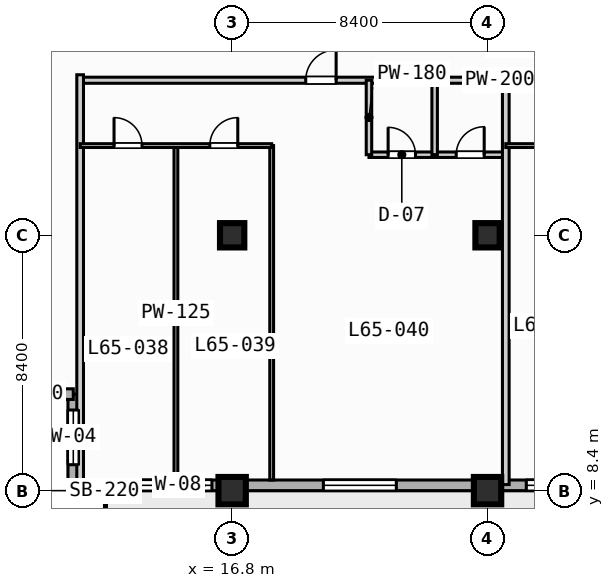
"""IFC4 building model, lengths in metres.
Left out: names, types, materials, properties, quantities, classifications, styles, units other than length and angle.
Written with IfcOpenShell. Run it as: python <this file> out.ifc"""

import sys

from ifc_helpers import new_model, si_unit, direction, frame, frame_2d, origin, origin_2d, place, context, subcontext, project, spatial, rectangle, extrude, element, fill, save


model = new_model("IFC4")
c1 = context("Model", 3, precision=1e-05, world=origin(), true_north=direction((0.0, 1.0)))
c2 = subcontext(c1, "Body", "Model", "MODEL_VIEW")
j1 = project(units=[si_unit("LENGTHUNIT", "METRE"), si_unit("PLANEANGLEUNIT", "RADIAN")], contexts=[c1])
p1 = place(None, origin())
s1 = spatial("IfcSite", under=j1, at=p1, CompositionType="ELEMENT")
p2 = place(p1, origin())
s2 = spatial("IfcBuilding", under=s1, at=p2, CompositionType="ELEMENT")
p3 = place(p2, frame((0.0, 0.0, 263.8)))
s3 = spatial("IfcBuildingStorey", under=s2, at=p3, CompositionType="ELEMENT", Elevation=263.8)
p4 = place(p3, frame((16.8, 8.4, 0.0), z_axis=(0.0, 0.0, 1.0), x_axis=(1.0, 0.0, 0.0)))
e1 = element("IfcColumn", 1, at=p4, inside=s3, PredefinedType="COLUMN", context=c2, shape_type="SweptSolid", body=[
    extrude(rectangle(XDim=0.9, YDim=0.9, at=origin_2d()), origin(), (0.0, 0.0, 1.0), 3.7),
])
p5 = place(p3, frame((16.8, 16.8, 0.0), z_axis=(0.0, 0.0, 1.0), x_axis=(1.0, 0.0, 0.0)))
e2 = element("IfcColumn", 2, at=p5, inside=s3, PredefinedType="COLUMN", context=c2, shape_type="SweptSolid", body=[
    extrude(rectangle(XDim=0.8, YDim=0.8, at=origin_2d()), origin(), (0.0, 0.0, 1.0), 3.7),
])
p6 = place(p3, frame((25.2, 8.4, 0.0), z_axis=(0.0, 0.0, 1.0), x_axis=(1.0, 0.0, 0.0)))
e3 = element("IfcColumn", 3, at=p6, inside=s3, PredefinedType="COLUMN", context=c2, shape_type="SweptSolid", body=[
    extrude(rectangle(XDim=0.9, YDim=0.9, at=origin_2d()), origin(), (0.0, 0.0, 1.0), 3.7),
])
p7 = place(p3, frame((25.2, 16.8, 0.0), z_axis=(0.0, 0.0, 1.0), x_axis=(1.0, 0.0, 0.0)))
e4 = element("IfcColumn", 4, at=p7, inside=s3, PredefinedType="COLUMN", context=c2, shape_type="SweptSolid", body=[
    extrude(rectangle(XDim=0.8, YDim=0.8, at=origin_2d()), origin(), (0.0, 0.0, 1.0), 3.7),
])
p8 = place(p3, frame((11.575, 8.575, 0.0), z_axis=(0.0, 0.0, 1.0), x_axis=(0.0, 1.0, 0.0)))
e5 = element("IfcWall", 5, at=p8, inside=s3, PredefinedType="STANDARD", context=c2, shape_type="SweptSolid", body=[
    extrude(rectangle(XDim=3.0, YDim=0.35, at=frame_2d((1.5, 0.0))), origin(), (0.0, 0.0, 1.0), 3.47),
])
p9 = place(p8, frame((0.677, 0.0, 0.85)))
e6 = element("IfcOpeningElement", 6, at=p9, cuts=e5, PredefinedType="OPENING", context=c2, shape_type="SweptSolid", body=[
    extrude(rectangle(XDim=1.8, YDim=1.8, at=frame_2d((0.9, 0.9))), frame((0.0, 0.185, 0.0), z_axis=(0.0, -1.0, 0.0), x_axis=(1.0, 0.0, 0.0)), (0.0, 0.0, 1.0), 0.37),
])
p10 = place(p3, frame((11.575, 11.575, 0.0), z_axis=(0.0, 0.0, 1.0), x_axis=(-1.0, 0.0, 0.0)))
e7 = element("IfcWall", 7, at=p10, inside=s3, PredefinedType="STANDARD", context=c2, shape_type="SweptSolid", body=[
    extrude(rectangle(XDim=3.0, YDim=0.35, at=frame_2d((1.5, 0.0))), origin(), (0.0, 0.0, 1.0), 3.47),
])
p11 = place(p3, frame((72.425, 8.575, 0.0), z_axis=(0.0, 0.0, 1.0), x_axis=(-1.0, 0.0, 0.0)))
e8 = element("IfcWall", 8, at=p11, inside=s3, PredefinedType="STANDARD", context=c2, shape_type="SweptSolid", body=[
    extrude(rectangle(XDim=60.85, YDim=0.35, at=frame_2d((30.425, 0.0))), origin(), (0.0, 0.0, 1.0), 3.47),
])
p12 = place(p11, frame((41.325, 0.0, 0.0)))
e9 = element("IfcOpeningElement", 9, at=p12, cuts=e8, PredefinedType="OPENING", context=c2, shape_type="SweptSolid", body=[
    extrude(rectangle(XDim=1.4, YDim=2.2, at=frame_2d((0.7, 1.1))), frame((0.0, 0.185, 0.0), z_axis=(0.0, -1.0, 0.0), x_axis=(1.0, 0.0, 0.0)), (0.0, 0.0, 1.0), 0.37),
])
p13 = place(p11, frame((50.225, 0.0, 0.85)))
e10 = element("IfcOpeningElement", 10, at=p13, cuts=e8, PredefinedType="OPENING", context=c2, shape_type="SweptSolid", body=[
    extrude(rectangle(XDim=2.4, YDim=1.95, at=frame_2d((1.2, 0.975))), frame((0.0, 0.185, 0.0), z_axis=(0.0, -1.0, 0.0), x_axis=(1.0, 0.0, 0.0)), (0.0, 0.0, 1.0), 0.37),
])
p14 = place(p11, frame((33.425, 0.0, 0.85)))
e11 = element("IfcOpeningElement", 11, at=p14, cuts=e8, PredefinedType="OPENING", context=c2, shape_type="SweptSolid", body=[
    extrude(rectangle(XDim=2.4, YDim=1.95, at=frame_2d((1.2, 0.975))), frame((0.0, 0.185, 0.0), z_axis=(0.0, -1.0, 0.0), x_axis=(1.0, 0.0, 0.0)), (0.0, 0.0, 1.0), 0.37),
])
p15 = place(p11, frame((25.325, 0.0, 0.85)))
e12 = element("IfcOpeningElement", 12, at=p15, cuts=e8, PredefinedType="OPENING", context=c2, shape_type="SweptSolid", body=[
    extrude(rectangle(XDim=1.8, YDim=1.8, at=frame_2d((0.9, 0.9))), frame((0.0, 0.185, 0.0), z_axis=(0.0, -1.0, 0.0), x_axis=(1.0, 0.0, 0.0)), (0.0, 0.0, 1.0), 0.37),
])
p16 = place(p11, frame((58.15, 0.0, 0.85)))
e13 = element("IfcOpeningElement", 13, at=p16, cuts=e8, PredefinedType="OPENING", context=c2, shape_type="SweptSolid", body=[
    extrude(rectangle(XDim=1.8, YDim=1.8, at=frame_2d((0.9, 0.9))), frame((0.0, 0.185, 0.0), z_axis=(0.0, -1.0, 0.0), x_axis=(1.0, 0.0, 0.0)), (0.0, 0.0, 1.0), 0.37),
])
p17 = place(p11, frame((56.29, 0.0, 0.85)))
e14 = element("IfcOpeningElement", 14, at=p17, cuts=e8, PredefinedType="OPENING", context=c2, shape_type="SweptSolid", body=[
    extrude(rectangle(XDim=0.72, YDim=1.8, at=frame_2d((0.36, 0.9))), frame((0.0, 0.185, 0.0), z_axis=(0.0, -1.0, 0.0), x_axis=(1.0, 0.0, 0.0)), (0.0, 0.0, 1.0), 0.37),
])
p18 = place(p11, frame((44.15, 0.0, 0.85)))
e15 = element("IfcOpeningElement", 15, at=p18, cuts=e8, PredefinedType="OPENING", context=c2, shape_type="SweptSolid", body=[
    extrude(rectangle(XDim=1.8, YDim=1.8, at=frame_2d((0.9, 0.9))), frame((0.0, 0.185, 0.0), z_axis=(0.0, -1.0, 0.0), x_axis=(1.0, 0.0, 0.0)), (0.0, 0.0, 1.0), 0.37),
])
p19 = place(p3, frame((11.8, 21.9, 0.0), z_axis=(0.0, 0.0, 1.0), x_axis=(1.0, 0.0, 0.0)))
e16 = element("IfcWall", 16, at=p19, inside=s3, PredefinedType="PARTITIONING", context=c2, shape_type="SweptSolid", body=[
    extrude(rectangle(XDim=27.6, YDim=0.2, at=frame_2d((13.8, 0.0))), origin(), (0.0, 0.0, 1.0), 3.47),
])
p20 = place(p19, frame((7.42, 0.0, 0.0)))
e17 = element("IfcOpeningElement", 17, at=p20, cuts=e16, PredefinedType="OPENING", context=c2, shape_type="SweptSolid", body=[
    extrude(rectangle(XDim=1.0, YDim=2.15, at=frame_2d((0.5, 1.075))), frame((0.0, 0.11, 0.0), z_axis=(0.0, -1.0, 0.0), x_axis=(1.0, 0.0, 0.0)), (0.0, 0.0, 1.0), 0.22),
])
p21 = place(p19, frame((21.22, 0.0, 0.0)))
e18 = element("IfcOpeningElement", 18, at=p21, cuts=e16, PredefinedType="OPENING", context=c2, shape_type="SweptSolid", body=[
    extrude(rectangle(XDim=1.0, YDim=2.15, at=frame_2d((0.5, 1.075))), frame((0.0, 0.11, 0.0), z_axis=(0.0, -1.0, 0.0), x_axis=(1.0, 0.0, 0.0)), (0.0, 0.0, 1.0), 0.22),
])
p22 = place(p3, frame((11.8, 8.6, 0.0), z_axis=(0.0, 0.0, 1.0), x_axis=(0.0, 1.0, 0.0)))
e19 = element("IfcWall", 19, at=p22, inside=s3, PredefinedType="PARTITIONING", context=c2, shape_type="SweptSolid", body=[
    extrude(rectangle(XDim=13.48, YDim=0.22, at=frame_2d((6.74, 0.0))), origin(), (0.0, 0.0, 1.0), 3.47),
])
p23 = place(p3, frame((21.3, 19.45, 0.0), z_axis=(0.0, 0.0, 1.0), x_axis=(1.0, 0.0, 0.0)))
e20 = element("IfcWall", 20, at=p23, inside=s3, PredefinedType="PLUMBINGWALL", context=c2, shape_type="SweptSolid", body=[
    extrude(rectangle(XDim=4.5, YDim=0.18, at=frame_2d((2.25, 0.0))), origin(), (0.0, 0.0, 1.0), 3.47),
])
p24 = place(p23, frame((0.63, 0.0, 0.0)))
e21 = element("IfcOpeningElement", 21, at=p24, cuts=e20, PredefinedType="OPENING", context=c2, shape_type="SweptSolid", body=[
    extrude(rectangle(XDim=0.9, YDim=2.1, at=frame_2d((0.45, 1.05))), frame((0.0, 0.1, 0.0), z_axis=(0.0, -1.0, 0.0), x_axis=(1.0, 0.0, 0.0)), (0.0, 0.0, 1.0), 0.2),
])
p25 = place(p23, frame((2.87, 0.0, 0.0)))
e22 = element("IfcOpeningElement", 22, at=p25, cuts=e20, PredefinedType="OPENING", context=c2, shape_type="SweptSolid", body=[
    extrude(rectangle(XDim=0.92, YDim=2.1, at=frame_2d((0.46, 1.05))), frame((0.0, 0.1, 0.0), z_axis=(0.0, -1.0, 0.0), x_axis=(1.0, 0.0, 0.0)), (0.0, 0.0, 1.0), 0.2),
])
for number, where, z_axis, x_axis in (
    (23, (21.3, 19.45, 0.0), (0.0, 0.0, 1.0), (0.0, 1.0, 0.0)),
    (24, (23.46, 19.45, 0.0), (0.0, 0.0, 1.0), (0.0, 1.0, 0.0)),
):
    element("IfcWall", number, at=place(p3, frame(where, z_axis=z_axis, x_axis=x_axis)), inside=s3, PredefinedType="PLUMBINGWALL", context=c2, shape_type="SweptSolid", body=[
        extrude(rectangle(XDim=2.45, YDim=0.18, at=frame_2d((1.225, 0.0))), origin(), (0.0, 0.0, 1.0), 3.47),
    ])
for number, where, z_axis, x_axis in (
    (25, (14.95, 8.75, 0.0), (0.0, 0.0, 1.0), (0.0, 1.0, 0.0)),
    (26, (18.1, 8.75, 0.0), (0.0, 0.0, 1.0), (0.0, 1.0, 0.0)),
):
    element("IfcWall", number, at=place(p3, frame(where, z_axis=z_axis, x_axis=x_axis)), inside=s3, PredefinedType="PARTITIONING", context=c2, shape_type="SweptSolid", body=[
        extrude(rectangle(XDim=11.0, YDim=0.125, at=frame_2d((5.5, 0.0))), origin(), (0.0, 0.0, 1.0), 3.47),
    ])
p26 = place(p3, frame((11.8, 19.75, 0.0), z_axis=(0.0, 0.0, 1.0), x_axis=(1.0, 0.0, 0.0)))
e27 = element("IfcWall", 27, at=p26, inside=s3, PredefinedType="PARTITIONING", context=c2, shape_type="SweptSolid", body=[
    extrude(rectangle(XDim=6.3, YDim=0.125, at=frame_2d((3.15, 0.0))), origin(), (0.0, 0.0, 1.0), 3.47),
])
p27 = place(p26, frame((1.115, 0.0, 0.0)))
e28 = element("IfcOpeningElement", 28, at=p27, cuts=e27, PredefinedType="OPENING", context=c2, shape_type="SweptSolid", body=[
    extrude(rectangle(XDim=0.92, YDim=2.1, at=frame_2d((0.46, 1.05))), frame((0.0, 0.073, 0.0), z_axis=(0.0, -1.0, 0.0), x_axis=(1.0, 0.0, 0.0)), (0.0, 0.0, 1.0), 0.145),
])
p28 = place(p26, frame((4.265, 0.0, 0.0)))
e29 = element("IfcOpeningElement", 29, at=p28, cuts=e27, PredefinedType="OPENING", context=c2, shape_type="SweptSolid", body=[
    extrude(rectangle(XDim=0.92, YDim=2.1, at=frame_2d((0.46, 1.05))), frame((0.0, 0.073, 0.0), z_axis=(0.0, -1.0, 0.0), x_axis=(1.0, 0.0, 0.0)), (0.0, 0.0, 1.0), 0.145),
])
p29 = place(p3, frame((25.8, 8.6, 0.0), z_axis=(0.0, 0.0, 1.0), x_axis=(0.0, 1.0, 0.0)))
e30 = element("IfcWall", 30, at=p29, inside=s3, PredefinedType="PARTITIONING", context=c2, shape_type="SweptSolid", body=[
    extrude(rectangle(XDim=13.48, YDim=0.22, at=frame_2d((6.74, 0.0))), origin(), (0.0, 0.0, 1.0), 3.47),
])
p30 = place(p3, frame((25.8, 19.75, 0.0), z_axis=(0.0, 0.0, 1.0), x_axis=(1.0, 0.0, 0.0)))
e31 = element("IfcWall", 31, at=p30, inside=s3, PredefinedType="PARTITIONING", context=c2, shape_type="SweptSolid", body=[
    extrude(rectangle(XDim=6.3, YDim=0.125, at=frame_2d((3.15, 0.0))), origin(), (0.0, 0.0, 1.0), 3.47),
])
p31 = place(p30, frame((1.115, 0.0, 0.0)))
e32 = element("IfcOpeningElement", 32, at=p31, cuts=e31, PredefinedType="OPENING", context=c2, shape_type="SweptSolid", body=[
    extrude(rectangle(XDim=0.92, YDim=2.1, at=frame_2d((0.46, 1.05))), frame((0.0, 0.073, 0.0), z_axis=(0.0, -1.0, 0.0), x_axis=(1.0, 0.0, 0.0)), (0.0, 0.0, 1.0), 0.145),
])
p32 = place(p30, frame((4.265, 0.0, 0.0)))
e33 = element("IfcOpeningElement", 33, at=p32, cuts=e31, PredefinedType="OPENING", context=c2, shape_type="SweptSolid", body=[
    extrude(rectangle(XDim=0.92, YDim=2.1, at=frame_2d((0.46, 1.05))), frame((0.0, 0.073, 0.0), z_axis=(0.0, -1.0, 0.0), x_axis=(1.0, 0.0, 0.0)), (0.0, 0.0, 1.0), 0.145),
])
p33 = place(p9, origin())
e34 = element("IfcWindow", 34, at=p33, inside=s3, PartitioningType="SINGLE_PANEL", PredefinedType="WINDOW", context=c2, shape_type="SweptSolid", body=[
    extrude(rectangle(XDim=1.8, YDim=1.8, at=frame_2d((0.9, 0.9))), frame((0.0, 0.03, 0.0), z_axis=(0.0, -1.0, 0.0), x_axis=(1.0, 0.0, 0.0)), (0.0, 0.0, 1.0), 0.06),
])
fill(e6, e34)
p34 = place(p13, origin())
e35 = element("IfcWindow", 35, at=p34, inside=s3, PartitioningType="SINGLE_PANEL", PredefinedType="WINDOW", context=c2, shape_type="SweptSolid", body=[
    extrude(rectangle(XDim=2.4, YDim=1.95, at=frame_2d((1.2, 0.975))), frame((0.0, 0.03, 0.0), z_axis=(0.0, -1.0, 0.0), x_axis=(1.0, 0.0, 0.0)), (0.0, 0.0, 1.0), 0.06),
])
fill(e10, e35)
p35 = place(p16, origin())
e36 = element("IfcWindow", 36, at=p35, inside=s3, PartitioningType="SINGLE_PANEL", PredefinedType="WINDOW", context=c2, shape_type="SweptSolid", body=[
    extrude(rectangle(XDim=1.8, YDim=1.8, at=frame_2d((0.9, 0.9))), frame((0.0, 0.03, 0.0), z_axis=(0.0, -1.0, 0.0), x_axis=(1.0, 0.0, 0.0)), (0.0, 0.0, 1.0), 0.06),
])
fill(e13, e36)
p36 = place(p17, origin())
e37 = element("IfcWindow", 37, at=p36, inside=s3, PartitioningType="SINGLE_PANEL", PredefinedType="WINDOW", context=c2, shape_type="SweptSolid", body=[
    extrude(rectangle(XDim=0.72, YDim=1.8, at=frame_2d((0.36, 0.9))), frame((0.0, 0.03, 0.0), z_axis=(0.0, -1.0, 0.0), x_axis=(1.0, 0.0, 0.0)), (0.0, 0.0, 1.0), 0.06),
])
fill(e14, e37)
p37 = place(p18, origin())
e38 = element("IfcWindow", 38, at=p37, inside=s3, PartitioningType="SINGLE_PANEL", PredefinedType="WINDOW", context=c2, shape_type="SweptSolid", body=[
    extrude(rectangle(XDim=1.8, YDim=1.8, at=frame_2d((0.9, 0.9))), frame((0.0, 0.03, 0.0), z_axis=(0.0, -1.0, 0.0), x_axis=(1.0, 0.0, 0.0)), (0.0, 0.0, 1.0), 0.06),
])
fill(e15, e38)
p38 = place(p20, origin())
e39 = element("IfcDoor", 39, at=p38, inside=s3, OperationType="SINGLE_SWING_RIGHT", PredefinedType="DOOR", context=c2, shape_type="SweptSolid", body=[
    extrude(rectangle(XDim=1.0, YDim=2.15, at=frame_2d((0.5, 1.075))), frame((0.0, 0.025, 0.0), z_axis=(0.0, -1.0, 0.0), x_axis=(1.0, 0.0, 0.0)), (0.0, 0.0, 1.0), 0.05),
])
fill(e17, e39)
p39 = place(p24, origin())
e40 = element("IfcDoor", 40, at=p39, inside=s3, OperationType="SINGLE_SWING_LEFT", PredefinedType="DOOR", context=c2, shape_type="SweptSolid", body=[
    extrude(rectangle(XDim=0.9, YDim=2.1, at=frame_2d((0.45, 1.05))), frame((0.0, 0.025, 0.0), z_axis=(0.0, -1.0, 0.0), x_axis=(1.0, 0.0, 0.0)), (0.0, 0.0, 1.0), 0.05),
])
fill(e21, e40)
p40 = place(p25, origin())
e41 = element("IfcDoor", 41, at=p40, inside=s3, OperationType="SINGLE_SWING_RIGHT", PredefinedType="DOOR", context=c2, shape_type="SweptSolid", body=[
    extrude(rectangle(XDim=0.92, YDim=2.1, at=frame_2d((0.46, 1.05))), frame((0.0, 0.025, 0.0), z_axis=(0.0, -1.0, 0.0), x_axis=(1.0, 0.0, 0.0)), (0.0, 0.0, 1.0), 0.05),
])
fill(e22, e41)
p41 = place(p27, origin())
e42 = element("IfcDoor", 42, at=p41, inside=s3, OperationType="SINGLE_SWING_LEFT", PredefinedType="DOOR", context=c2, shape_type="SweptSolid", body=[
    extrude(rectangle(XDim=0.92, YDim=2.1, at=frame_2d((0.46, 1.05))), frame((0.0, 0.025, 0.0), z_axis=(0.0, -1.0, 0.0), x_axis=(1.0, 0.0, 0.0)), (0.0, 0.0, 1.0), 0.05),
])
fill(e28, e42)
p42 = place(p28, origin())
e43 = element("IfcDoor", 43, at=p42, inside=s3, OperationType="SINGLE_SWING_RIGHT", PredefinedType="DOOR", context=c2, shape_type="SweptSolid", body=[
    extrude(rectangle(XDim=0.92, YDim=2.1, at=frame_2d((0.46, 1.05))), frame((0.0, 0.025, 0.0), z_axis=(0.0, -1.0, 0.0), x_axis=(1.0, 0.0, 0.0)), (0.0, 0.0, 1.0), 0.05),
])
fill(e29, e43)
save(model, sys.argv[1])
